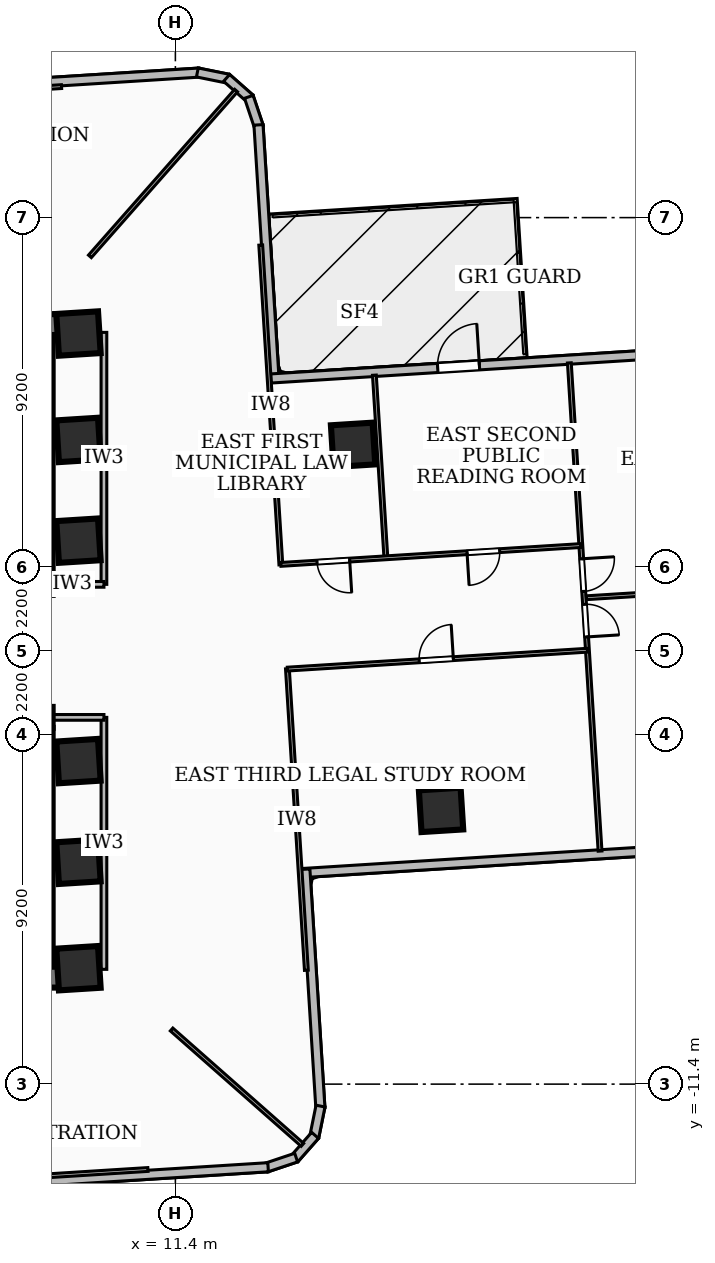
"""IFC4 building model, lengths in metres.
Left out: names, types, materials, properties, quantities, classifications, styles, units other than length and angle.
Written with IfcOpenShell. Run it as: python <this file> out.ifc"""

import sys

from ifc_helpers import new_model, si_unit, direction, frame, frame_2d, origin, origin_2d, place, context, subcontext, project, spatial, rectangle, extrude, element, fill, save


model = new_model("IFC4")
c1 = context("Model", 3, precision=1e-05, world=origin(), true_north=direction((0.0, 1.0)))
c2 = subcontext(c1, "Body", "Model", "MODEL_VIEW")
j1 = project(units=[si_unit("LENGTHUNIT", "METRE"), si_unit("PLANEANGLEUNIT", "RADIAN")], contexts=[c1])
p1 = place(None, origin())
s1 = spatial("IfcSite", under=j1, at=p1, CompositionType="ELEMENT")
p2 = place(p1, origin())
s2 = spatial("IfcBuilding", under=s1, at=p2, CompositionType="ELEMENT")
p3 = place(p2, frame((0.0, 0.0, 53.28)))
s3 = spatial("IfcBuildingStorey", under=s2, at=p3, CompositionType="ELEMENT", Elevation=53.28)
p4 = place(p3, frame((-8.78, 8.585, 0.0), z_axis=(0.0, 0.0, 1.0), x_axis=(1.0, 0.0, 0.0)))
e1 = element("IfcWall", 1, at=p4, inside=s3, PredefinedType="SHEAR", context=c2, shape_type="SweptSolid", body=[
    extrude(rectangle(XDim=17.56, YDim=0.55, at=frame_2d((8.78, 0.0))), origin(), (0.0, 0.0, 1.0), 3.32),
])
p5 = place(p3, frame((8.17, 1.75, 0.0), z_axis=(0.0, 0.0, 1.0), x_axis=(-1.0, 0.0, 0.0)))
e2 = element("IfcWall", 2, at=p5, inside=s3, PredefinedType="SHEAR", context=c2, shape_type="SweptSolid", body=[
    extrude(rectangle(XDim=16.34, YDim=0.55, at=frame_2d((8.17, 0.0))), origin(), (0.0, 0.0, 1.0), 3.32),
])
p6 = place(p5, frame((7.45, 0.0, 0.0)))
e3 = element("IfcOpeningElement", 3, at=p6, cuts=e2, PredefinedType="OPENING", context=c2, shape_type="SweptSolid", body=[
    extrude(rectangle(XDim=1.0, YDim=2.1, at=frame_2d((0.5, 1.05))), frame((0.0, 0.285, 0.0), z_axis=(0.0, -1.0, 0.0), x_axis=(1.0, 0.0, 0.0)), (0.0, 0.0, 1.0), 0.57),
])
p7 = place(p5, frame((3.85, 0.0, 0.0)))
e4 = element("IfcOpeningElement", 4, at=p7, cuts=e2, PredefinedType="OPENING", context=c2, shape_type="SweptSolid", body=[
    extrude(rectangle(XDim=0.9, YDim=2.06, at=frame_2d((0.45, 1.03))), frame((0.0, 0.285, 0.0), z_axis=(0.0, -1.0, 0.0), x_axis=(1.0, 0.0, 0.0)), (0.0, 0.0, 1.0), 0.57),
])
p8 = place(p5, frame((2.35, 0.0, 0.0)))
e5 = element("IfcOpeningElement", 5, at=p8, cuts=e2, PredefinedType="OPENING", context=c2, shape_type="SweptSolid", body=[
    extrude(rectangle(XDim=0.9, YDim=2.06, at=frame_2d((0.45, 1.03))), frame((0.0, 0.285, 0.0), z_axis=(0.0, -1.0, 0.0), x_axis=(1.0, 0.0, 0.0)), (0.0, 0.0, 1.0), 0.57),
])
p9 = place(p5, frame((0.8, 0.0, 0.0)))
e6 = element("IfcOpeningElement", 6, at=p9, cuts=e2, PredefinedType="OPENING", context=c2, shape_type="SweptSolid", body=[
    extrude(rectangle(XDim=0.9, YDim=2.06, at=frame_2d((0.45, 1.03))), frame((0.0, 0.285, 0.0), z_axis=(0.0, -1.0, 0.0), x_axis=(1.0, 0.0, 0.0)), (0.0, 0.0, 1.0), 0.57),
])
p10 = place(p3, frame((7.895, 8.31, 0.0), z_axis=(0.0, 0.0, 1.0), x_axis=(0.0, -1.0, 0.0)))
e7 = element("IfcWall", 7, at=p10, inside=s3, PredefinedType="SHEAR", context=c2, shape_type="SweptSolid", body=[
    extrude(rectangle(XDim=6.285, YDim=0.55, at=frame_2d((3.143, 0.0))), origin(), (0.0, 0.0, 1.0), 3.32),
])
p11 = place(p3, frame((8.78, -8.585, 0.0), z_axis=(0.0, 0.0, 1.0), x_axis=(-1.0, 0.0, 0.0)))
e8 = element("IfcWall", 8, at=p11, inside=s3, PredefinedType="SHEAR", context=c2, shape_type="SweptSolid", body=[
    extrude(rectangle(XDim=17.56, YDim=0.55, at=frame_2d((8.78, 0.0))), origin(), (0.0, 0.0, 1.0), 3.32),
])
p12 = place(p3, frame((-8.17, -1.75, 0.0), z_axis=(0.0, 0.0, 1.0), x_axis=(1.0, 0.0, 0.0)))
e9 = element("IfcWall", 9, at=p12, inside=s3, PredefinedType="SHEAR", context=c2, shape_type="SweptSolid", body=[
    extrude(rectangle(XDim=16.34, YDim=0.55, at=frame_2d((8.17, 0.0))), origin(), (0.0, 0.0, 1.0), 3.32),
])
p13 = place(p12, frame((7.45, 0.0, 0.0)))
e10 = element("IfcOpeningElement", 10, at=p13, cuts=e9, PredefinedType="OPENING", context=c2, shape_type="SweptSolid", body=[
    extrude(rectangle(XDim=1.0, YDim=2.1, at=frame_2d((0.5, 1.05))), frame((0.0, 0.285, 0.0), z_axis=(0.0, -1.0, 0.0), x_axis=(1.0, 0.0, 0.0)), (0.0, 0.0, 1.0), 0.57),
])
p14 = place(p12, frame((10.965, 0.0, 0.0)))
e11 = element("IfcOpeningElement", 11, at=p14, cuts=e9, PredefinedType="OPENING", context=c2, shape_type="SweptSolid", body=[
    extrude(rectangle(XDim=1.05, YDim=2.15, at=frame_2d((0.525, 1.075))), frame((0.0, 0.285, 0.0), z_axis=(0.0, -1.0, 0.0), x_axis=(1.0, 0.0, 0.0)), (0.0, 0.0, 1.0), 0.57),
])
p15 = place(p12, frame((12.525, 0.0, 0.0)))
e12 = element("IfcOpeningElement", 12, at=p15, cuts=e9, PredefinedType="OPENING", context=c2, shape_type="SweptSolid", body=[
    extrude(rectangle(XDim=1.05, YDim=2.15, at=frame_2d((0.525, 1.075))), frame((0.0, 0.285, 0.0), z_axis=(0.0, -1.0, 0.0), x_axis=(1.0, 0.0, 0.0)), (0.0, 0.0, 1.0), 0.57),
])
p16 = place(p12, frame((14.085, 0.0, 0.0)))
e13 = element("IfcOpeningElement", 13, at=p16, cuts=e9, PredefinedType="OPENING", context=c2, shape_type="SweptSolid", body=[
    extrude(rectangle(XDim=1.05, YDim=2.15, at=frame_2d((0.525, 1.075))), frame((0.0, 0.285, 0.0), z_axis=(0.0, -1.0, 0.0), x_axis=(1.0, 0.0, 0.0)), (0.0, 0.0, 1.0), 0.57),
])
p17 = place(p3, frame((7.895, -2.025, 0.0), z_axis=(0.0, 0.0, 1.0), x_axis=(0.0, -1.0, 0.0)))
e14 = element("IfcWall", 14, at=p17, inside=s3, PredefinedType="SHEAR", context=c2, shape_type="SweptSolid", body=[
    extrude(rectangle(XDim=6.285, YDim=0.55, at=frame_2d((3.143, 0.0))), origin(), (0.0, 0.0, 1.0), 3.32),
])
for number, where, z_axis, x_axis in (
    (15, (8.85, -5.55, 0.0), (0.0, 0.0, 1.0), (0.998, 0.063, 0.0)),
    (16, (8.85, -2.9, 0.0), (0.0, 0.0, 1.0), (0.998, 0.063, 0.0)),
    (17, (8.85, 2.9, 0.0), (0.0, 0.0, 1.0), (0.998, 0.063, 0.0)),
    (18, (8.85, 5.55, 0.0), (0.0, 0.0, 1.0), (0.998, 0.063, 0.0)),
    (19, (8.85, -8.35, 0.0), (0.0, 0.0, 1.0), (0.998, 0.063, 0.0)),
    (20, (8.85, 8.35, 0.0), (0.0, 0.0, 1.0), (0.998, 0.063, 0.0)),
    (21, (18.391, -4.184, 0.0), (0.0, 0.0, 1.0), (0.998, 0.063, 0.0)),
    (22, (16.076, 5.421, 0.0), (0.0, 0.0, 1.0), (0.998, 0.063, 0.0)),
):
    element("IfcColumn", number, at=place(p3, frame(where, z_axis=z_axis, x_axis=x_axis)), inside=s3, PredefinedType="COLUMN", context=c2, shape_type="SweptSolid", body=[
        extrude(rectangle(XDim=1.1, YDim=1.1, at=origin_2d()), origin(), (0.0, 0.0, 1.0), 3.6),
    ])
p18 = place(p3, frame((5.745, 14.82, 0.0), z_axis=(0.0, 0.0, 1.0), x_axis=(0.998019696231, 0.062902193405, 0.0)))
e23 = element("IfcWall", 23, at=p18, inside=s3, PredefinedType="SOLIDWALL", context=c2, shape_type="SweptSolid", body=[
    extrude(rectangle(XDim=6.295, YDim=0.24, at=frame_2d((3.148, 0.0))), origin(), (0.0, 0.0, 1.0), 2.401),
])
p19 = place(p3, frame((11.978, 15.219, 0.0), z_axis=(0.0, 0.0, 1.0), x_axis=(0.980057147523, -0.198715846348, 0.0)))
e24 = element("IfcWall", 24, at=p19, inside=s3, PredefinedType="SOLIDWALL", context=c2, shape_type="SweptSolid", body=[
    extrude(rectangle(XDim=0.831, YDim=0.24, at=frame_2d((0.415, 0.0))), origin(), (0.0, 0.0, 1.0), 3.32),
])
p20 = place(p3, frame((12.748, 15.076, 0.0), z_axis=(0.0, 0.0, 1.0), x_axis=(0.750588777208, -0.66076961759, 0.0)))
e25 = element("IfcWall", 25, at=p20, inside=s3, PredefinedType="SOLIDWALL", context=c2, shape_type="SweptSolid", body=[
    extrude(rectangle(XDim=0.815, YDim=0.24, at=frame_2d((0.408, 0.0))), origin(), (0.0, 0.0, 1.0), 3.32),
])
p21 = place(p3, frame((13.333, 14.578, 0.0), z_axis=(0.0, 0.0, 1.0), x_axis=(0.317992207862, -0.948093326492, 0.0)))
e26 = element("IfcWall", 26, at=p21, inside=s3, PredefinedType="SOLIDWALL", context=c2, shape_type="SweptSolid", body=[
    extrude(rectangle(XDim=0.83, YDim=0.24, at=frame_2d((0.415, 0.0))), origin(), (0.0, 0.0, 1.0), 3.32),
])
p22 = place(p3, frame((13.587, 13.84, 0.0), z_axis=(0.0, 0.0, 1.0), x_axis=(0.062867237505, -0.998021898782, 0.0)))
e27 = element("IfcWall", 27, at=p22, inside=s3, PredefinedType="SOLIDWALL", context=c2, shape_type="SweptSolid", body=[
    extrude(rectangle(XDim=6.777, YDim=0.24, at=frame_2d((3.388, 0.0))), origin(), (0.0, 0.0, 1.0), 3.32),
])
p23 = place(p3, frame((13.911, 7.167, 0.0), z_axis=(0.0, 0.0, 1.0), x_axis=(0.99802143782, 0.062874554885, 0.0)))
e28 = element("IfcWall", 28, at=p23, inside=s3, PredefinedType="SOLIDWALL", context=c2, shape_type="SweptSolid", body=[
    extrude(rectangle(XDim=16.875, YDim=0.24, at=frame_2d((8.438, 0.0))), origin(), (0.0, 0.0, 1.0), 3.32),
])
p24 = place(p23, frame((4.4, 0.0, 0.0)))
e29 = element("IfcOpeningElement", 29, at=p24, cuts=e28, PredefinedType="OPENING", context=c2, shape_type="SweptSolid", body=[
    extrude(rectangle(XDim=1.1, YDim=2.1, at=frame_2d((0.55, 1.05))), frame((0.0, 0.13, 0.0), z_axis=(0.0, -1.0, 0.0), x_axis=(1.0, 0.0, 0.0)), (0.0, 0.0, 1.0), 0.26),
])
p25 = place(p3, frame((31.572, -4.787, 0.0), z_axis=(0.0, 0.0, 1.0), x_axis=(-0.998025974342, -0.062802504235, 0.0)))
e30 = element("IfcWall", 30, at=p25, inside=s3, PredefinedType="SOLIDWALL", context=c2, shape_type="SweptSolid", body=[
    extrude(rectangle(XDim=16.875, YDim=0.24, at=frame_2d((8.438, 0.0))), origin(), (0.0, 0.0, 1.0), 3.32),
])
p26 = place(p25, frame((1.1, 0.0, 0.85)))
e31 = element("IfcOpeningElement", 31, at=p26, cuts=e30, PredefinedType="OPENING", context=c2, shape_type="SweptSolid", body=[
    extrude(rectangle(XDim=2.1, YDim=2.0, at=frame_2d((1.05, 1.0))), frame((0.0, 0.13, 0.0), z_axis=(0.0, -1.0, 0.0), x_axis=(1.0, 0.0, 0.0)), (0.0, 0.0, 1.0), 0.26),
])
p27 = place(p3, frame((14.82, -5.745, 0.0), z_axis=(0.0, 0.0, 1.0), x_axis=(0.062902193405, -0.998019696231, 0.0)))
e32 = element("IfcWall", 32, at=p27, inside=s3, PredefinedType="SOLIDWALL", context=c2, shape_type="SweptSolid", body=[
    extrude(rectangle(XDim=6.295, YDim=0.24, at=frame_2d((3.148, 0.0))), origin(), (0.0, 0.0, 1.0), 3.32),
])
p28 = place(p3, frame((15.219, -11.978, 0.0), z_axis=(0.0, 0.0, 1.0), x_axis=(-0.198715846348, -0.980057147523, 0.0)))
e33 = element("IfcWall", 33, at=p28, inside=s3, PredefinedType="SOLIDWALL", context=c2, shape_type="SweptSolid", body=[
    extrude(rectangle(XDim=0.831, YDim=0.24, at=frame_2d((0.415, 0.0))), origin(), (0.0, 0.0, 1.0), 3.32),
])
p29 = place(p3, frame((15.076, -12.748, 0.0), z_axis=(0.0, 0.0, 1.0), x_axis=(-0.66076961759, -0.750588777208, 0.0)))
e34 = element("IfcWall", 34, at=p29, inside=s3, PredefinedType="SOLIDWALL", context=c2, shape_type="SweptSolid", body=[
    extrude(rectangle(XDim=0.815, YDim=0.24, at=frame_2d((0.408, 0.0))), origin(), (0.0, 0.0, 1.0), 3.32),
])
p30 = place(p3, frame((14.578, -13.333, 0.0), z_axis=(0.0, 0.0, 1.0), x_axis=(-0.948093326492, -0.317992207862, 0.0)))
e35 = element("IfcWall", 35, at=p30, inside=s3, PredefinedType="SOLIDWALL", context=c2, shape_type="SweptSolid", body=[
    extrude(rectangle(XDim=0.83, YDim=0.24, at=frame_2d((0.415, 0.0))), origin(), (0.0, 0.0, 1.0), 3.32),
])
p31 = place(p3, frame((13.84, -13.587, 0.0), z_axis=(0.0, 0.0, 1.0), x_axis=(-0.998021898782, -0.062867237505, 0.0)))
e36 = element("IfcWall", 36, at=p31, inside=s3, PredefinedType="SOLIDWALL", context=c2, shape_type="SweptSolid", body=[
    extrude(rectangle(XDim=6.777, YDim=0.24, at=frame_2d((3.388, 0.0))), origin(), (0.0, 0.0, 1.0), 3.32),
])
p32 = place(p3, frame((9.52, 1.75, 0.0), z_axis=(0.0, 0.0, 1.0), x_axis=(0.0, 1.0, 0.0)))
e37 = element("IfcWall", 37, at=p32, inside=s3, PredefinedType="PARTITIONING", context=c2, shape_type="SweptSolid", body=[
    extrude(rectangle(XDim=6.63, YDim=0.15, at=frame_2d((3.315, 0.0))), origin(), (0.0, 0.0, 1.0), 2.401),
])
p33 = place(p3, frame((7.85, 1.75, 0.0), z_axis=(0.0, 0.0, 1.0), x_axis=(1.0, 0.0, 0.0)))
e38 = element("IfcWall", 38, at=p33, inside=s3, PredefinedType="PARTITIONING", context=c2, shape_type="SweptSolid", body=[
    extrude(rectangle(XDim=1.67, YDim=0.15, at=frame_2d((0.835, 0.0))), origin(), (0.0, 0.0, 1.0), 2.385),
])
p34 = place(p3, frame((9.52, -8.38, 0.0), z_axis=(0.0, 0.0, 1.0), x_axis=(0.0, 1.0, 0.0)))
e39 = element("IfcWall", 39, at=p34, inside=s3, PredefinedType="PARTITIONING", context=c2, shape_type="SweptSolid", body=[
    extrude(rectangle(XDim=6.63, YDim=0.15, at=frame_2d((3.315, 0.0))), origin(), (0.0, 0.0, 1.0), 2.401),
])
p35 = place(p3, frame((7.85, -1.75, 0.0), z_axis=(0.0, 0.0, 1.0), x_axis=(1.0, 0.0, 0.0)))
e40 = element("IfcWall", 40, at=p35, inside=s3, PredefinedType="PARTITIONING", context=c2, shape_type="SweptSolid", body=[
    extrude(rectangle(XDim=1.67, YDim=0.15, at=frame_2d((0.835, 0.0))), origin(), (0.0, 0.0, 1.0), 2.385),
])
p36 = place(p3, frame((9.151, 10.38, 0.0), z_axis=(0.0, 0.0, 1.0), x_axis=(0.661373124857, 0.750057057641, 0.0)))
e41 = element("IfcWall", 41, at=p36, inside=s3, PredefinedType="PARTITIONING", context=c2, shape_type="SweptSolid", body=[
    extrude(rectangle(XDim=5.817, YDim=0.1, at=frame_2d((2.908, 0.0))), origin(), (0.0, 0.0, 1.0), 3.32),
])
p37 = place(p3, frame((11.3, -9.962, 0.0), z_axis=(0.0, 0.0, 1.0), x_axis=(0.750020974917, -0.661414043686, 0.0)))
e42 = element("IfcWall", 42, at=p37, inside=s3, PredefinedType="PARTITIONING", context=c2, shape_type="SweptSolid", body=[
    extrude(rectangle(XDim=4.59, YDim=0.1, at=frame_2d((2.295, 0.0))), origin(), (0.0, 0.0, 1.0), 3.32),
])
p38 = place(p3, frame((14.176, 2.265, 0.0), z_axis=(0.0, 0.0, 1.0), x_axis=(-0.062875924382, 0.998021351542, 0.0)))
e43 = element("IfcWall", 43, at=p38, inside=s3, PredefinedType="PARTITIONING", context=c2, shape_type="SweptSolid", body=[
    extrude(rectangle(XDim=8.43, YDim=0.1, at=frame_2d((4.215, 0.0))), origin(), (0.0, 0.0, 1.0), 2.401),
])
p39 = place(p3, frame((14.847, -8.404, 0.0), z_axis=(0.0, 0.0, 1.0), x_axis=(-0.062772139706, 0.998027884619, 0.0)))
e44 = element("IfcWall", 44, at=p39, inside=s3, PredefinedType="PARTITIONING", context=c2, shape_type="SweptSolid", body=[
    extrude(rectangle(XDim=7.95, YDim=0.1, at=frame_2d((3.975, 0.0))), origin(), (0.0, 0.0, 1.0), 2.401),
])
p40 = place(p3, frame((16.938, 2.468, 0.0), z_axis=(0.0, 0.0, 1.0), x_axis=(-0.062774483496, 0.998027737201, 0.0)))
e45 = element("IfcWall", 45, at=p40, inside=s3, PredefinedType="PARTITIONING", context=c2, shape_type="SweptSolid", body=[
    extrude(rectangle(XDim=4.795, YDim=0.1, at=frame_2d((2.398, 0.0))), origin(), (0.0, 0.0, 1.0), 2.401),
])
p41 = place(p3, frame((22.07, 2.771, 0.0), z_axis=(0.0, 0.0, 1.0), x_axis=(-0.998031627252, -0.062712606425, 0.0)))
e46 = element("IfcWall", 46, at=p41, inside=s3, PredefinedType="PARTITIONING", context=c2, shape_type="SweptSolid", body=[
    extrude(rectangle(XDim=7.911, YDim=0.1, at=frame_2d((3.955, 0.0))), origin(), (0.0, 0.0, 1.0), 3.32),
])
p42 = place(p41, frame((6.096, 0.0, 0.0)))
e47 = element("IfcOpeningElement", 47, at=p42, cuts=e46, PredefinedType="OPENING", context=c2, shape_type="SweptSolid", body=[
    extrude(rectangle(XDim=0.86, YDim=2.04, at=frame_2d((0.43, 1.02))), frame((0.0, 0.06, 0.0), z_axis=(0.0, -1.0, 0.0), x_axis=(1.0, 0.0, 0.0)), (0.0, 0.0, 1.0), 0.12),
])
p43 = place(p41, frame((2.141, 0.0, 0.0)))
e48 = element("IfcOpeningElement", 48, at=p43, cuts=e46, PredefinedType="OPENING", context=c2, shape_type="SweptSolid", body=[
    extrude(rectangle(XDim=0.86, YDim=2.04, at=frame_2d((0.43, 1.02))), frame((0.0, 0.06, 0.0), z_axis=(0.0, -1.0, 0.0), x_axis=(1.0, 0.0, 0.0)), (0.0, 0.0, 1.0), 0.12),
])
p44 = place(p3, frame((14.348, -0.48, 0.0), z_axis=(0.0, 0.0, 1.0), x_axis=(0.998023893104, 0.062835569496, 0.0)))
e49 = element("IfcWall", 49, at=p44, inside=s3, PredefinedType="PARTITIONING", context=c2, shape_type="SweptSolid", body=[
    extrude(rectangle(XDim=7.911, YDim=0.1, at=frame_2d((3.955, 0.0))), origin(), (0.0, 0.0, 1.0), 3.32),
])
p45 = place(p44, frame((3.475, 0.0, 0.0)))
e50 = element("IfcOpeningElement", 50, at=p45, cuts=e49, PredefinedType="OPENING", context=c2, shape_type="SweptSolid", body=[
    extrude(rectangle(XDim=0.9, YDim=2.06, at=frame_2d((0.45, 1.03))), frame((0.0, 0.06, 0.0), z_axis=(0.0, -1.0, 0.0), x_axis=(1.0, 0.0, 0.0)), (0.0, 0.0, 1.0), 0.12),
])
p46 = place(p3, frame((22.216, 1.398, 0.0), z_axis=(0.0, 0.0, 1.0), x_axis=(0.998025462108, 0.062810643876, 0.0)))
e51 = element("IfcWall", 51, at=p46, inside=s3, PredefinedType="PARTITIONING", context=c2, shape_type="SweptSolid", body=[
    extrude(rectangle(XDim=10.335, YDim=0.1, at=frame_2d((5.168, 0.0))), origin(), (0.0, 0.0, 1.0), 2.812),
])
p47 = place(p3, frame((21.767, 7.577, 0.0), z_axis=(0.0, 0.0, 1.0), x_axis=(0.062769180357, -0.998028070746, 0.0)))
e52 = element("IfcWall", 52, at=p47, inside=s3, PredefinedType="PARTITIONING", context=c2, shape_type="SweptSolid", body=[
    extrude(rectangle(XDim=12.87, YDim=0.1, at=frame_2d((6.435, 0.0))), origin(), (0.0, 0.0, 1.0), 2.401),
])
p48 = place(p47, frame((6.365, 0.0, 0.0)))
e53 = element("IfcOpeningElement", 53, at=p48, cuts=e52, PredefinedType="OPENING", context=c2, shape_type="SweptSolid", body=[
    extrude(rectangle(XDim=0.86, YDim=2.04, at=frame_2d((0.43, 1.02))), frame((0.0, 0.06, 0.0), z_axis=(0.0, -1.0, 0.0), x_axis=(1.0, 0.0, 0.0)), (0.0, 0.0, 1.0), 0.12),
])
p49 = place(p47, frame((5.165, 0.0, 0.0)))
e54 = element("IfcOpeningElement", 54, at=p49, cuts=e52, PredefinedType="OPENING", context=c2, shape_type="SweptSolid", body=[
    extrude(rectangle(XDim=0.86, YDim=2.04, at=frame_2d((0.43, 1.02))), frame((0.0, 0.06, 0.0), z_axis=(0.0, -1.0, 0.0), x_axis=(1.0, 0.0, 0.0)), (0.0, 0.0, 1.0), 0.12),
])
p50 = place(p3, frame((8.404, 14.847, 0.0), z_axis=(0.0, 0.0, 1.0), x_axis=(-0.998027884619, -0.062772139706, 0.0)))
e55 = element("IfcWall", 55, at=p50, inside=s3, PredefinedType="PARTITIONING", context=c2, shape_type="SweptSolid", body=[
    extrude(rectangle(XDim=7.95, YDim=0.1, at=frame_2d((3.975, 0.0))), origin(), (0.0, 0.0, 1.0), 2.401),
])
p51 = place(p3, frame((2.265, -14.176, 0.0), z_axis=(0.0, 0.0, 1.0), x_axis=(0.998021351542, 0.062875924382, 0.0)))
e56 = element("IfcWall", 56, at=p51, inside=s3, PredefinedType="PARTITIONING", context=c2, shape_type="SweptSolid", body=[
    extrude(rectangle(XDim=8.43, YDim=0.1, at=frame_2d((4.215, 0.0))), origin(), (0.0, 0.0, 1.0), 2.401),
])
p52 = place(p24, origin())
e57 = element("IfcDoor", 57, at=p52, inside=s3, OperationType="SINGLE_SWING_RIGHT", PredefinedType="DOOR", context=c2, shape_type="SweptSolid", body=[
    extrude(rectangle(XDim=1.1, YDim=2.1, at=frame_2d((0.55, 1.05))), frame((0.0, 0.025, 0.0), z_axis=(0.0, -1.0, 0.0), x_axis=(1.0, 0.0, 0.0)), (0.0, 0.0, 1.0), 0.05),
])
fill(e29, e57)
p53 = place(p42, origin())
e58 = element("IfcDoor", 58, at=p53, inside=s3, OperationType="SINGLE_SWING_LEFT", PredefinedType="DOOR", context=c2, shape_type="SweptSolid", body=[
    extrude(rectangle(XDim=0.86, YDim=2.04, at=frame_2d((0.43, 1.02))), frame((0.0, 0.025, 0.0), z_axis=(0.0, -1.0, 0.0), x_axis=(1.0, 0.0, 0.0)), (0.0, 0.0, 1.0), 0.05),
])
fill(e47, e58)
p54 = place(p43, origin())
e59 = element("IfcDoor", 59, at=p54, inside=s3, OperationType="SINGLE_SWING_RIGHT", PredefinedType="DOOR", context=c2, shape_type="SweptSolid", body=[
    extrude(rectangle(XDim=0.86, YDim=2.04, at=frame_2d((0.43, 1.02))), frame((0.0, 0.025, 0.0), z_axis=(0.0, -1.0, 0.0), x_axis=(1.0, 0.0, 0.0)), (0.0, 0.0, 1.0), 0.05),
])
fill(e48, e59)
p55 = place(p45, origin())
e60 = element("IfcDoor", 60, at=p55, inside=s3, OperationType="SINGLE_SWING_RIGHT", PredefinedType="DOOR", context=c2, shape_type="SweptSolid", body=[
    extrude(rectangle(XDim=0.9, YDim=2.06, at=frame_2d((0.45, 1.03))), frame((0.0, 0.025, 0.0), z_axis=(0.0, -1.0, 0.0), x_axis=(1.0, 0.0, 0.0)), (0.0, 0.0, 1.0), 0.05),
])
fill(e50, e60)
p56 = place(p48, origin())
e61 = element("IfcDoor", 61, at=p56, inside=s3, OperationType="SINGLE_SWING_RIGHT", PredefinedType="DOOR", context=c2, shape_type="SweptSolid", body=[
    extrude(rectangle(XDim=0.86, YDim=2.04, at=frame_2d((0.43, 1.02))), frame((0.0, 0.025, 0.0), z_axis=(0.0, -1.0, 0.0), x_axis=(1.0, 0.0, 0.0)), (0.0, 0.0, 1.0), 0.05),
])
fill(e53, e61)
p57 = place(p49, origin())
e62 = element("IfcDoor", 62, at=p57, inside=s3, OperationType="SINGLE_SWING_LEFT", PredefinedType="DOOR", context=c2, shape_type="SweptSolid", body=[
    extrude(rectangle(XDim=0.86, YDim=2.04, at=frame_2d((0.43, 1.02))), frame((0.0, 0.025, 0.0), z_axis=(0.0, -1.0, 0.0), x_axis=(1.0, 0.0, 0.0)), (0.0, 0.0, 1.0), 0.05),
])
fill(e54, e62)
save(model, sys.argv[1])
